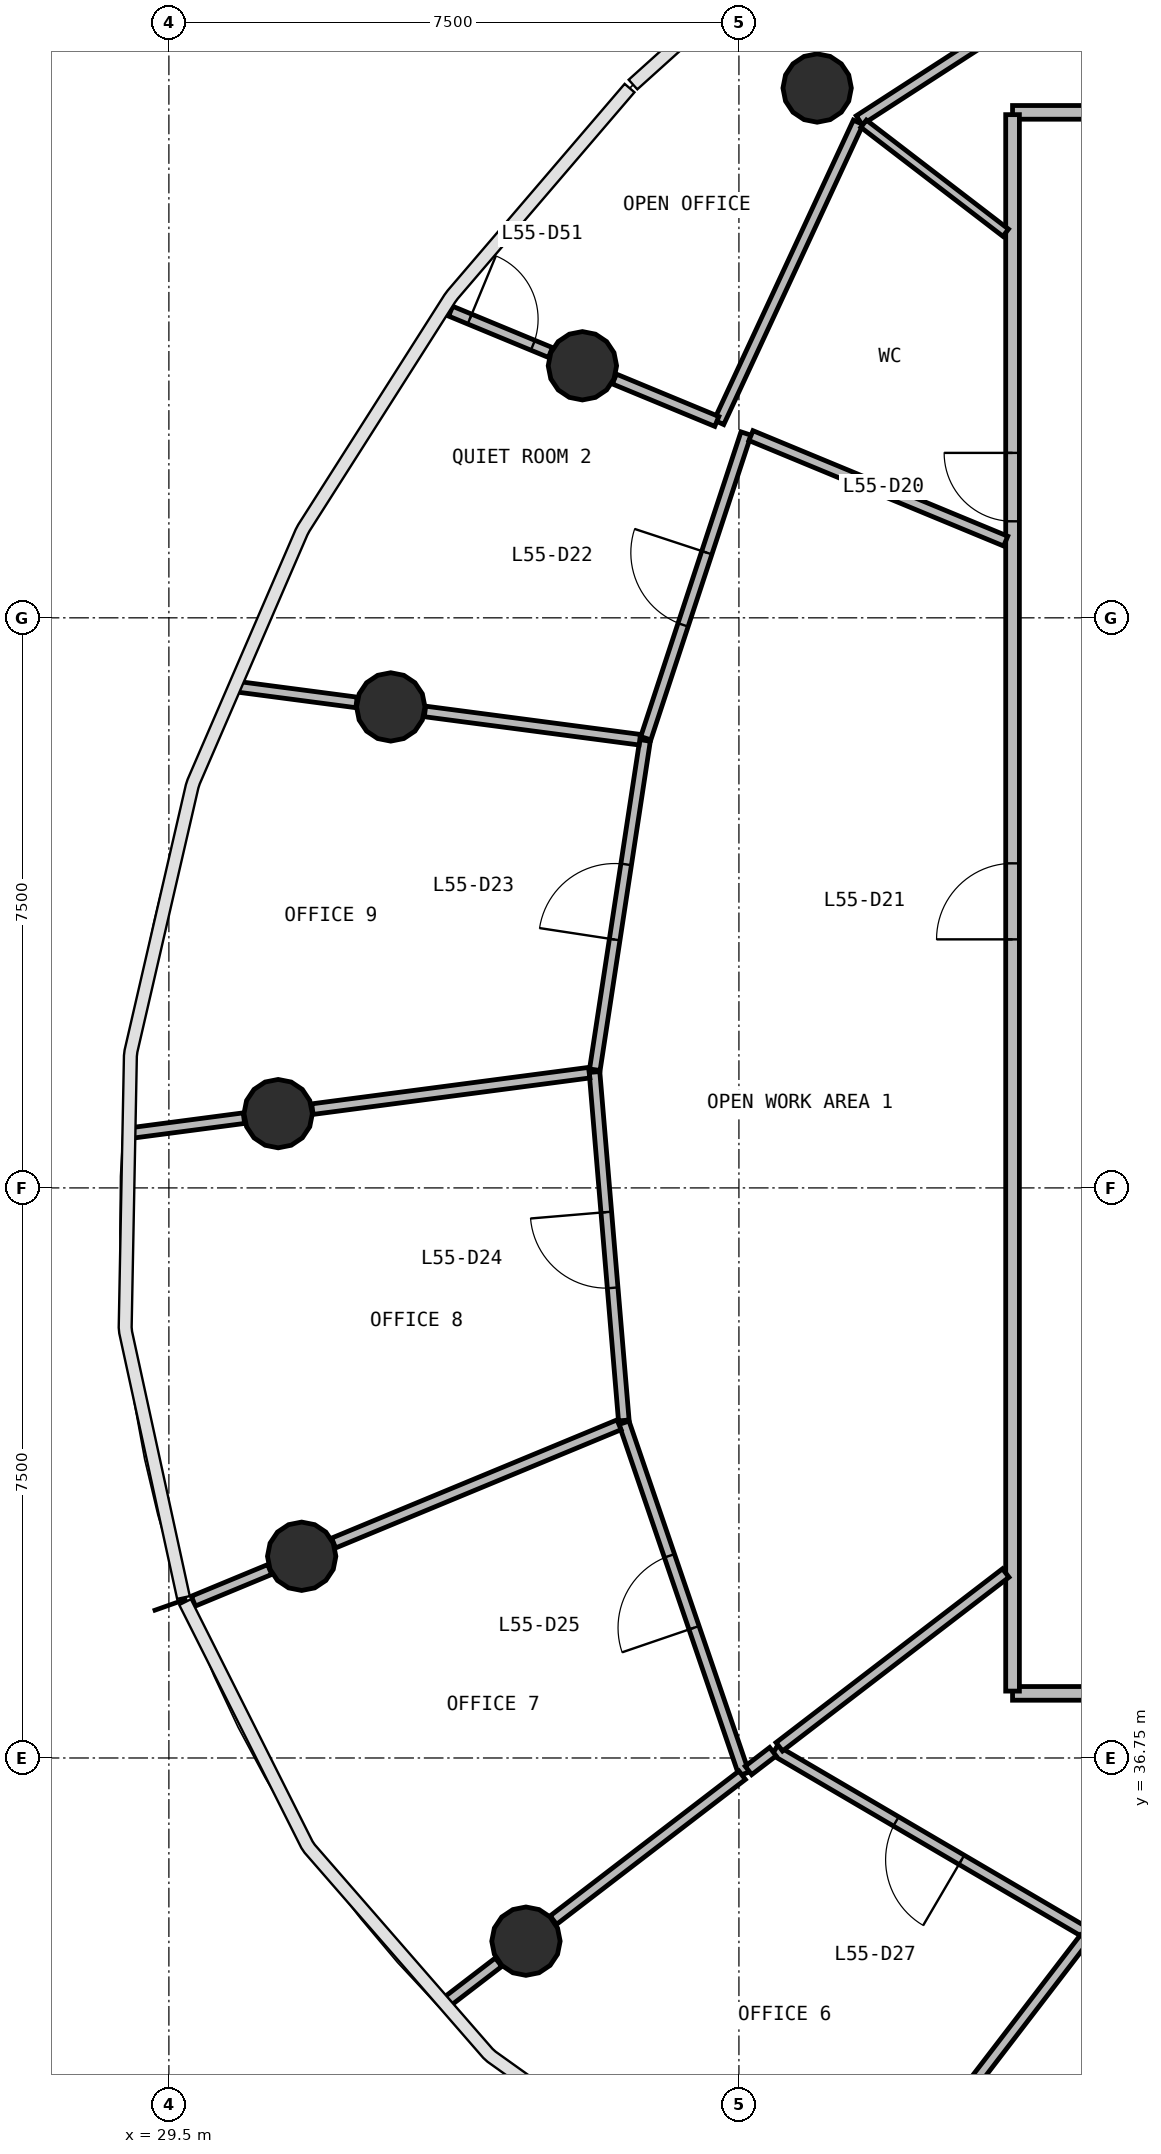
"""IFC4 building model, lengths in metres.
Left out: names, types, materials, properties, quantities, classifications, styles, units other than length and angle.
Written with IfcOpenShell. Run it as: python <this file> out.ifc"""

import sys

from ifc_helpers import new_model, si_unit, direction, frame, frame_2d, origin, origin_2d, place, context, subcontext, project, spatial, rectangle, circle, extrude, source, transform, mapped, element, fill, save


model = new_model("IFC4")
c1 = context("Model", 3, precision=1e-05, world=origin(), true_north=direction((0.0, 1.0)))
c2 = subcontext(c1, "Body", "Model", "MODEL_VIEW")
j1 = project(units=[si_unit("LENGTHUNIT", "METRE"), si_unit("PLANEANGLEUNIT", "RADIAN")], contexts=[c1])
p1 = place(None, origin())
s1 = spatial("IfcSite", under=j1, at=p1, CompositionType="ELEMENT")
p2 = place(p1, origin())
s2 = spatial("IfcBuilding", under=s1, at=p2, CompositionType="ELEMENT")
p3 = place(p2, frame((0.0, 0.0, 226.7)))
s3 = spatial("IfcBuildingStorey", under=s2, at=p3, CompositionType="ELEMENT", Elevation=226.7)
m1 = source(origin(), c2, "Body", "SweptSolid", [
    extrude(circle(Radius=0.45, at=origin_2d()), origin(), (0.0, 0.0, 1.0), 3.9),
])
for number, where, z_axis, x_axis in (
    (1, (38.029, 58.72, 0.0), (0.0, 0.0, 1.0), (1.0, 0.0, 0.0)),
    (2, (34.941, 55.066, 0.0), (0.0, 0.0, 1.0), (1.0, 0.0, 0.0)),
    (3, (32.419, 50.578, 0.0), (0.0, 0.0, 1.0), (1.0, 0.0, 0.0)),
    (4, (30.938, 45.227, 0.0), (0.0, 0.0, 1.0), (1.0, 0.0, 0.0)),
    (5, (31.247, 39.404, 0.0), (0.0, 0.0, 1.0), (1.0, 0.0, 0.0)),
    (6, (34.198, 34.34, 0.0), (0.0, 0.0, 1.0), (1.0, 0.0, 0.0)),
):
    element("IfcColumn", number, at=place(p3, frame(where, z_axis=z_axis, x_axis=x_axis)), inside=s3, PredefinedType="COLUMN", context=c2, shape_type="MappedRepresentation", body=[
        mapped(m1, transform((0.0, 0.0, 0.0), scale=1.0)),
    ])
p4 = place(p3, frame((40.6, 58.4, 0.0), z_axis=(0.0, 0.0, 1.0), x_axis=(1.0, 0.0, 0.0)))
e7 = element("IfcWall", 7, at=p4, inside=s3, PredefinedType="PARTITIONING", context=c2, shape_type="SweptSolid", body=[
    extrude(rectangle(XDim=22.8, YDim=0.18, at=frame_2d((11.4, 0.0))), origin(), (0.0, 0.0, 1.0), 2.7),
])
p5 = place(p4, frame((2.05, 0.0, 0.0)))
e8 = element("IfcOpeningElement", 8, at=p5, cuts=e7, PredefinedType="OPENING", context=c2, shape_type="SweptSolid", body=[
    extrude(rectangle(XDim=0.9, YDim=2.1, at=frame_2d((0.45, 1.05))), frame((0.0, 0.1, 0.0), z_axis=(0.0, -1.0, 0.0), x_axis=(1.0, 0.0, 0.0)), (0.0, 0.0, 1.0), 0.2),
])
p6 = place(p4, frame((12.95, 0.0, 0.0)))
e9 = element("IfcOpeningElement", 9, at=p6, cuts=e7, PredefinedType="OPENING", context=c2, shape_type="SweptSolid", body=[
    extrude(rectangle(XDim=1.0, YDim=2.1, at=frame_2d((0.5, 1.05))), frame((0.0, 0.1, 0.0), z_axis=(0.0, -1.0, 0.0), x_axis=(1.0, 0.0, 0.0)), (0.0, 0.0, 1.0), 0.2),
])
p7 = place(p4, frame((10.95, 0.0, 0.0)))
e10 = element("IfcOpeningElement", 10, at=p7, cuts=e7, PredefinedType="OPENING", context=c2, shape_type="SweptSolid", body=[
    extrude(rectangle(XDim=1.0, YDim=2.1, at=frame_2d((0.5, 1.05))), frame((0.0, 0.1, 0.0), z_axis=(0.0, -1.0, 0.0), x_axis=(1.0, 0.0, 0.0)), (0.0, 0.0, 1.0), 0.2),
])
p8 = place(p3, frame((63.4, 37.6, 0.0), z_axis=(0.0, 0.0, 1.0), x_axis=(-1.0, 0.0, 0.0)))
e11 = element("IfcWall", 11, at=p8, inside=s3, PredefinedType="PARTITIONING", context=c2, shape_type="SweptSolid", body=[
    extrude(rectangle(XDim=22.8, YDim=0.18, at=frame_2d((11.4, 0.0))), origin(), (0.0, 0.0, 1.0), 2.7),
])
p9 = place(p8, frame((16.15, 0.0, 0.0)))
e12 = element("IfcOpeningElement", 12, at=p9, cuts=e11, PredefinedType="OPENING", context=c2, shape_type="SweptSolid", body=[
    extrude(rectangle(XDim=1.0, YDim=2.1, at=frame_2d((0.5, 1.05))), frame((0.0, 0.1, 0.0), z_axis=(0.0, -1.0, 0.0), x_axis=(1.0, 0.0, 0.0)), (0.0, 0.0, 1.0), 0.2),
])
p10 = place(p8, frame((10.95, 0.0, 0.0)))
e13 = element("IfcOpeningElement", 13, at=p10, cuts=e11, PredefinedType="OPENING", context=c2, shape_type="SweptSolid", body=[
    extrude(rectangle(XDim=1.0, YDim=2.1, at=frame_2d((0.5, 1.05))), frame((0.0, 0.1, 0.0), z_axis=(0.0, -1.0, 0.0), x_axis=(1.0, 0.0, 0.0)), (0.0, 0.0, 1.0), 0.2),
])
p11 = place(p3, frame((40.6, 37.63, 0.0), z_axis=(0.0, 0.0, 1.0), x_axis=(0.0, 1.0, 0.0)))
e14 = element("IfcWall", 14, at=p11, inside=s3, PredefinedType="PARTITIONING", context=c2, shape_type="SweptSolid", body=[
    extrude(rectangle(XDim=20.74, YDim=0.18, at=frame_2d((10.37, 0.0))), origin(), (0.0, 0.0, 1.0), 2.7),
])
p12 = place(p11, frame((15.39, 0.0, 0.0)))
e15 = element("IfcOpeningElement", 15, at=p12, cuts=e14, PredefinedType="OPENING", context=c2, shape_type="SweptSolid", body=[
    extrude(rectangle(XDim=0.9, YDim=2.1, at=frame_2d((0.45, 1.05))), frame((0.0, 0.1, 0.0), z_axis=(0.0, -1.0, 0.0), x_axis=(1.0, 0.0, 0.0)), (0.0, 0.0, 1.0), 0.2),
])
p13 = place(p11, frame((9.89, 0.0, 0.0)))
e16 = element("IfcOpeningElement", 16, at=p13, cuts=e14, PredefinedType="OPENING", context=c2, shape_type="SweptSolid", body=[
    extrude(rectangle(XDim=1.0, YDim=2.1, at=frame_2d((0.5, 1.05))), frame((0.0, 0.1, 0.0), z_axis=(0.0, -1.0, 0.0), x_axis=(1.0, 0.0, 0.0)), (0.0, 0.0, 1.0), 0.2),
])
p14 = place(p3, frame((37.066, 36.541, 0.0), z_axis=(0.0, 0.0, 1.0), x_axis=(-0.323330654383, 0.946286049742, 0.0)))
e17 = element("IfcWall", 17, at=p14, inside=s3, PredefinedType="PARTITIONING", context=c2, shape_type="SweptSolid", body=[
    extrude(rectangle(XDim=4.882, YDim=0.14, at=frame_2d((2.441, 0.0))), origin(), (0.0, 0.0, 1.0), 2.7),
])
p15 = place(p14, frame((2.032, 0.0, 0.0)))
e18 = element("IfcOpeningElement", 18, at=p15, cuts=e17, PredefinedType="OPENING", context=c2, shape_type="SweptSolid", body=[
    extrude(rectangle(XDim=1.0, YDim=2.1, at=frame_2d((0.5, 1.05))), frame((0.0, 0.08, 0.0), z_axis=(0.0, -1.0, 0.0), x_axis=(1.0, 0.0, 0.0)), (0.0, 0.0, 1.0), 0.16),
])
p16 = place(p3, frame((41.592, 34.436, 0.0), z_axis=(0.0, 0.0, 1.0), x_axis=(-0.862711041689, 0.505697200455, 0.0)))
e19 = element("IfcWall", 19, at=p16, inside=s3, PredefinedType="PARTITIONING", context=c2, shape_type="SweptSolid", body=[
    extrude(rectangle(XDim=4.777, YDim=0.14, at=frame_2d((2.388, 0.0))), origin(), (0.0, 0.0, 1.0), 2.7),
])
p17 = place(p16, frame((1.927, 0.0, 0.0)))
e20 = element("IfcOpeningElement", 20, at=p17, cuts=e19, PredefinedType="OPENING", context=c2, shape_type="SweptSolid", body=[
    extrude(rectangle(XDim=1.0, YDim=2.1, at=frame_2d((0.5, 1.05))), frame((0.0, 0.08, 0.0), z_axis=(0.0, -1.0, 0.0), x_axis=(1.0, 0.0, 0.0)), (0.0, 0.0, 1.0), 0.16),
])
p18 = place(p3, frame((35.485, 41.19, 0.0), z_axis=(0.0, 0.0, 1.0), x_axis=(-0.083840307862, 0.996479203384, 0.0)))
e21 = element("IfcWall", 21, at=p18, inside=s3, PredefinedType="PARTITIONING", context=c2, shape_type="SweptSolid", body=[
    extrude(rectangle(XDim=4.601, YDim=0.14, at=frame_2d((2.3, 0.0))), origin(), (0.0, 0.0, 1.0), 2.7),
])
p19 = place(p18, frame((1.751, 0.0, 0.0)))
e22 = element("IfcOpeningElement", 22, at=p19, cuts=e21, PredefinedType="OPENING", context=c2, shape_type="SweptSolid", body=[
    extrude(rectangle(XDim=1.0, YDim=2.1, at=frame_2d((0.5, 1.05))), frame((0.0, 0.08, 0.0), z_axis=(0.0, -1.0, 0.0), x_axis=(1.0, 0.0, 0.0)), (0.0, 0.0, 1.0), 0.16),
])
p20 = place(p3, frame((35.104, 45.805, 0.0), z_axis=(0.0, 0.0, 1.0), x_axis=(0.150788763126, 0.988566006352, 0.0)))
e23 = element("IfcWall", 23, at=p20, inside=s3, PredefinedType="PARTITIONING", context=c2, shape_type="SweptSolid", body=[
    extrude(rectangle(XDim=4.383, YDim=0.14, at=frame_2d((2.191, 0.0))), origin(), (0.0, 0.0, 1.0), 2.7),
])
p21 = place(p20, frame((1.733, 0.0, 0.0)))
e24 = element("IfcOpeningElement", 24, at=p21, cuts=e23, PredefinedType="OPENING", context=c2, shape_type="SweptSolid", body=[
    extrude(rectangle(XDim=1.0, YDim=2.1, at=frame_2d((0.5, 1.05))), frame((0.0, 0.08, 0.0), z_axis=(0.0, -1.0, 0.0), x_axis=(1.0, 0.0, 0.0)), (0.0, 0.0, 1.0), 0.16),
])
p22 = place(p3, frame((42.27, 60.68, 0.0), z_axis=(0.0, 0.0, 1.0), x_axis=(-0.839801255045, -0.542893960202, 0.0)))
e25 = element("IfcWall", 25, at=p22, inside=s3, PredefinedType="PARTITIONING", context=c2, shape_type="SweptSolid", body=[
    extrude(rectangle(XDim=4.392, YDim=0.14, at=frame_2d((2.196, 0.0))), origin(), (0.0, 0.0, 1.0), 2.7),
])
p23 = place(p3, frame((38.569, 58.269, 0.0), z_axis=(0.0, 0.0, 1.0), x_axis=(-0.421127790684, -0.907001314174, 0.0)))
e26 = element("IfcWall", 26, at=p23, inside=s3, PredefinedType="PARTITIONING", context=c2, shape_type="SweptSolid", body=[
    extrude(rectangle(XDim=4.352, YDim=0.14, at=frame_2d((2.176, 0.0))), origin(), (0.0, 0.0, 1.0), 2.7),
])
p24 = place(p3, frame((35.774, 50.166, 0.0), z_axis=(0.0, 0.0, 1.0), x_axis=(0.312511306012, 0.949914040119, 0.0)))
e27 = element("IfcWall", 27, at=p24, inside=s3, PredefinedType="PARTITIONING", context=c2, shape_type="SweptSolid", body=[
    extrude(rectangle(XDim=4.22, YDim=0.14, at=frame_2d((2.11, 0.0))), origin(), (0.0, 0.0, 1.0), 2.7),
])
p25 = place(p24, frame((1.57, 0.0, 0.0)))
e28 = element("IfcOpeningElement", 28, at=p25, cuts=e27, PredefinedType="OPENING", context=c2, shape_type="SweptSolid", body=[
    extrude(rectangle(XDim=1.0, YDim=2.1, at=frame_2d((0.5, 1.05))), frame((0.0, 0.08, 0.0), z_axis=(0.0, -1.0, 0.0), x_axis=(1.0, 0.0, 0.0)), (0.0, 0.0, 1.0), 0.16),
])
p26 = place(p3, frame((35.423, 41.134, 0.0), z_axis=(0.0, 0.0, 1.0), x_axis=(-0.923885083547, -0.382670030705, 0.0)))
e29 = element("IfcWall", 29, at=p26, inside=s3, PredefinedType="PARTITIONING", context=c2, shape_type="SweptSolid", body=[
    extrude(rectangle(XDim=4.065, YDim=0.14, at=frame_2d((2.033, 0.0))), origin(), (0.0, 0.0, 1.0), 2.7),
])
p27 = place(p3, frame((40.51, 39.183, 0.0), z_axis=(0.0, 0.0, 1.0), x_axis=(-0.793375044347, -0.608733142688, 0.0)))
e30 = element("IfcWall", 30, at=p27, inside=s3, PredefinedType="PARTITIONING", context=c2, shape_type="SweptSolid", body=[
    extrude(rectangle(XDim=3.755, YDim=0.14, at=frame_2d((1.877, 0.0))), origin(), (0.0, 0.0, 1.0), 2.7),
])
p28 = place(p3, frame((40.51, 52.759, 0.0), z_axis=(0.0, 0.0, 1.0), x_axis=(-0.923873298868, 0.382698481365, 0.0)))
e31 = element("IfcWall", 31, at=p28, inside=s3, PredefinedType="PARTITIONING", context=c2, shape_type="SweptSolid", body=[
    extrude(rectangle(XDim=3.628, YDim=0.14, at=frame_2d((1.814, 0.0))), origin(), (0.0, 0.0, 1.0), 2.7),
])
p29 = place(p3, frame((35.03, 45.766, 0.0), z_axis=(0.0, 0.0, 1.0), x_axis=(-0.991443659817, -0.130535318622, 0.0)))
e32 = element("IfcWall", 32, at=p29, inside=s3, PredefinedType="PARTITIONING", context=c2, shape_type="SweptSolid", body=[
    extrude(rectangle(XDim=3.673, YDim=0.14, at=frame_2d((1.837, 0.0))), origin(), (0.0, 0.0, 1.0), 2.7),
])
p30 = place(p3, frame((41.549, 34.38, 0.0), z_axis=(0.0, 0.0, 1.0), x_axis=(-0.608751958666, -0.793360607051, 0.0)))
e33 = element("IfcWall", 33, at=p30, inside=s3, PredefinedType="PARTITIONING", context=c2, shape_type="SweptSolid", body=[
    extrude(rectangle(XDim=3.583, YDim=0.14, at=frame_2d((1.791, 0.0))), origin(), (0.0, 0.0, 1.0), 2.7),
])
p31 = place(p3, frame((37.042, 36.523, 0.0), z_axis=(0.0, 0.0, 1.0), x_axis=(-0.7933452348, -0.608771992145, 0.0)))
e34 = element("IfcWall", 34, at=p31, inside=s3, PredefinedType="PARTITIONING", context=c2, shape_type="SweptSolid", body=[
    extrude(rectangle(XDim=3.131, YDim=0.14, at=frame_2d((1.565, 0.0))), origin(), (0.0, 0.0, 1.0), 2.7),
])
p32 = place(p3, frame((35.696, 50.146, 0.0), z_axis=(0.0, 0.0, 1.0), x_axis=(-0.991443505247, 0.130536492613, 0.0)))
e35 = element("IfcWall", 35, at=p32, inside=s3, PredefinedType="PARTITIONING", context=c2, shape_type="SweptSolid", body=[
    extrude(rectangle(XDim=2.85, YDim=0.14, at=frame_2d((1.425, 0.0))), origin(), (0.0, 0.0, 1.0), 2.7),
])
p33 = place(p3, frame((31.969, 50.637, 0.0), z_axis=(0.0, 0.0, 1.0), x_axis=(-0.991431072845, 0.130630883778, 0.0)))
e36 = element("IfcWall", 36, at=p33, inside=s3, PredefinedType="PARTITIONING", context=c2, shape_type="SweptSolid", body=[
    extrude(rectangle(XDim=1.575, YDim=0.14, at=frame_2d((0.788, 0.0))), origin(), (0.0, 0.0, 1.0), 2.7),
])
p34 = place(p3, frame((30.487, 45.168, 0.0), z_axis=(0.0, 0.0, 1.0), x_axis=(-0.991448742538, -0.130496708462, 0.0)))
e37 = element("IfcWall", 37, at=p34, inside=s3, PredefinedType="PARTITIONING", context=c2, shape_type="SweptSolid", body=[
    extrude(rectangle(XDim=1.497, YDim=0.14, at=frame_2d((0.748, 0.0))), origin(), (0.0, 0.0, 1.0), 2.7),
])
p35 = place(p3, frame((36.709, 54.334, 0.0), z_axis=(0.0, 0.0, 1.0), x_axis=(-0.923872023258, 0.382701560803, 0.0)))
e38 = element("IfcWall", 38, at=p35, inside=s3, PredefinedType="PARTITIONING", context=c2, shape_type="SweptSolid", body=[
    extrude(rectangle(XDim=1.459, YDim=0.14, at=frame_2d((0.729, 0.0))), origin(), (0.0, 0.0, 1.0), 2.7),
])
p36 = place(p3, frame((33.207, 55.784, 0.0), z_axis=(0.0, 0.0, 1.0), x_axis=(0.923908003556, -0.382614689949, 0.0)))
e39 = element("IfcWall", 39, at=p36, inside=s3, PredefinedType="PARTITIONING", context=c2, shape_type="SweptSolid", body=[
    extrude(rectangle(XDim=1.422, YDim=0.14, at=frame_2d((0.711, 0.0))), origin(), (0.0, 0.0, 1.0), 2.7),
])
p37 = place(p36, frame((0.272, 0.0, 0.0)))
e40 = element("IfcOpeningElement", 40, at=p37, cuts=e39, PredefinedType="OPENING", context=c2, shape_type="SweptSolid", body=[
    extrude(rectangle(XDim=0.9, YDim=2.1, at=frame_2d((0.45, 1.05))), frame((0.0, 0.08, 0.0), z_axis=(0.0, -1.0, 0.0), x_axis=(1.0, 0.0, 0.0)), (0.0, 0.0, 1.0), 0.16),
])
p38 = place(p3, frame((30.826, 39.23, 0.0), z_axis=(0.0, 0.0, 1.0), x_axis=(-0.923885455133, -0.382669133579, 0.0)))
e41 = element("IfcWall", 41, at=p38, inside=s3, PredefinedType="PARTITIONING", context=c2, shape_type="SweptSolid", body=[
    extrude(rectangle(XDim=1.087, YDim=0.14, at=frame_2d((0.543, 0.0))), origin(), (0.0, 0.0, 1.0), 2.7),
])
p39 = place(p3, frame((33.837, 34.063, 0.0), z_axis=(0.0, 0.0, 1.0), x_axis=(-0.793325147434, -0.608798168894, 0.0)))
e42 = element("IfcWall", 42, at=p39, inside=s3, PredefinedType="PARTITIONING", context=c2, shape_type="SweptSolid", body=[
    extrude(rectangle(XDim=0.867, YDim=0.14, at=frame_2d((0.433, 0.0))), origin(), (0.0, 0.0, 1.0), 2.7),
])
p40 = place(p3, frame((37.447, 36.833, 0.0), z_axis=(0.0, 0.0, 1.0), x_axis=(-0.793093157812, -0.609100355469, 0.0)))
e43 = element("IfcWall", 43, at=p40, inside=s3, PredefinedType="PARTITIONING", context=c2, shape_type="SweptSolid", body=[
    extrude(rectangle(XDim=0.406, YDim=0.14, at=frame_2d((0.203, 0.0))), origin(), (0.0, 0.0, 1.0), 2.7),
])
p41 = place(p3, frame((40.51, 56.817, 0.0), z_axis=(0.0, 0.0, 1.0), x_axis=(-0.793374494853, 0.608733858856, 0.0)))
e44 = element("IfcWall", 44, at=p41, inside=s3, PredefinedType="PARTITIONING", context=c2, shape_type="SweptSolid", body=[
    extrude(rectangle(XDim=2.356, YDim=0.12, at=frame_2d((1.178, 0.0))), origin(), (0.0, 0.0, 1.0), 2.7),
])
m2 = source(origin(), c2, "Body", "SweptSolid", [
    extrude(rectangle(XDim=0.9, YDim=2.1, at=frame_2d((0.45, 1.05))), frame((0.0, 0.025, 0.0), z_axis=(0.0, -1.0, 0.0), x_axis=(1.0, 0.0, 0.0)), (0.0, 0.0, 1.0), 0.05),
])
p42 = place(p12, origin())
e45 = element("IfcDoor", 45, at=p42, inside=s3, OperationType="SINGLE_SWING_RIGHT", PredefinedType="DOOR", context=c2, shape_type="MappedRepresentation", body=[
    mapped(m2, transform((0.0, 0.0, 0.0), scale=1.0)),
])
fill(e15, e45)
m3 = source(origin(), c2, "Body", "SweptSolid", [
    extrude(rectangle(XDim=1.0, YDim=2.1, at=frame_2d((0.5, 1.05))), frame((0.0, 0.025, 0.0), z_axis=(0.0, -1.0, 0.0), x_axis=(1.0, 0.0, 0.0)), (0.0, 0.0, 1.0), 0.05),
])
p43 = place(p13, origin())
e46 = element("IfcDoor", 46, at=p43, inside=s3, OperationType="SINGLE_SWING_LEFT", PredefinedType="DOOR", context=c2, shape_type="MappedRepresentation", body=[
    mapped(m3, transform((0.0, 0.0, 0.0), scale=1.0)),
])
fill(e16, e46)
p44 = place(p25, origin())
e47 = element("IfcDoor", 47, at=p44, inside=s3, OperationType="SINGLE_SWING_RIGHT", PredefinedType="DOOR", context=c2, shape_type="MappedRepresentation", body=[
    mapped(m3, transform((0.0, 0.0, 0.0), scale=1.0)),
])
fill(e28, e47)
p45 = place(p21, origin())
e48 = element("IfcDoor", 48, at=p45, inside=s3, OperationType="SINGLE_SWING_LEFT", PredefinedType="DOOR", context=c2, shape_type="MappedRepresentation", body=[
    mapped(m3, transform((0.0, 0.0, 0.0), scale=1.0)),
])
fill(e24, e48)
p46 = place(p19, origin())
e49 = element("IfcDoor", 49, at=p46, inside=s3, OperationType="SINGLE_SWING_RIGHT", PredefinedType="DOOR", context=c2, shape_type="MappedRepresentation", body=[
    mapped(m3, transform((0.0, 0.0, 0.0), scale=1.0)),
])
fill(e22, e49)
p47 = place(p15, origin())
e50 = element("IfcDoor", 50, at=p47, inside=s3, OperationType="SINGLE_SWING_LEFT", PredefinedType="DOOR", context=c2, shape_type="MappedRepresentation", body=[
    mapped(m3, transform((0.0, 0.0, 0.0), scale=1.0)),
])
fill(e18, e50)
p48 = place(p17, origin())
e51 = element("IfcDoor", 51, at=p48, inside=s3, OperationType="SINGLE_SWING_LEFT", PredefinedType="DOOR", context=c2, shape_type="MappedRepresentation", body=[
    mapped(m3, transform((0.0, 0.0, 0.0), scale=1.0)),
])
fill(e20, e51)
m4 = source(origin(), c2, "Body", "SweptSolid", [
    extrude(rectangle(XDim=0.9, YDim=2.1, at=frame_2d((0.45, 1.05))), frame((0.0, 0.025, 0.0), z_axis=(0.0, -1.0, 0.0), x_axis=(1.0, 0.0, 0.0)), (0.0, 0.0, 1.0), 0.05),
])
p49 = place(p37, origin())
e52 = element("IfcDoor", 52, at=p49, inside=s3, OperationType="SINGLE_SWING_LEFT", PredefinedType="DOOR", context=c2, shape_type="MappedRepresentation", body=[
    mapped(m4, transform((0.0, 0.0, 0.0), scale=1.0)),
])
fill(e40, e52)
save(model, sys.argv[1])
